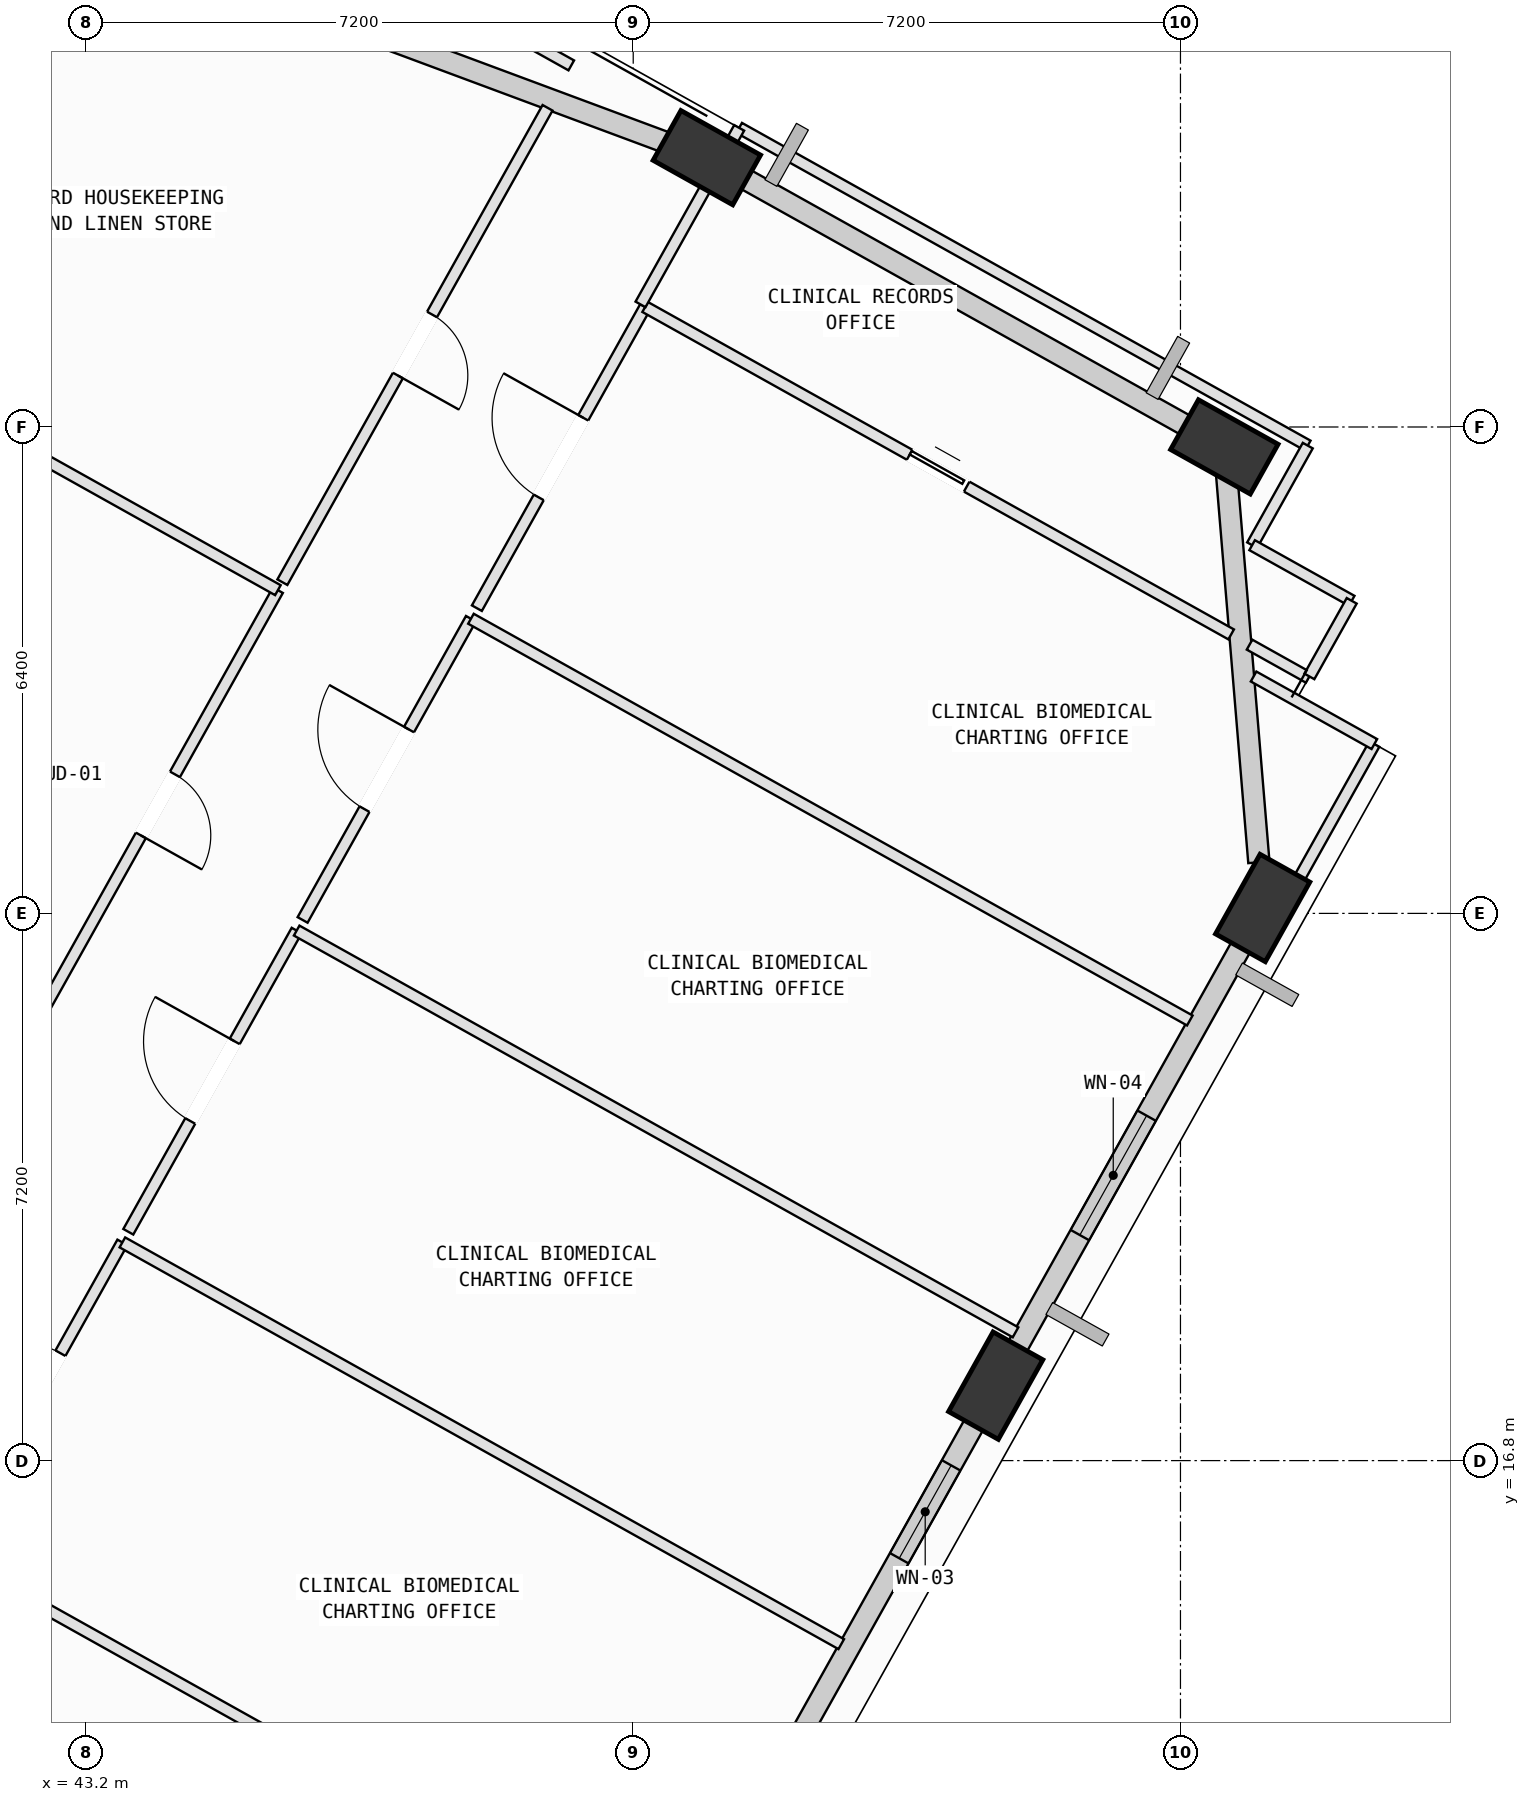
"""IFC4 building model, lengths in metres.
Left out: names, types, materials, properties, quantities, classifications, styles, units other than length and angle.
Written with IfcOpenShell. Run it as: python <this file> out.ifc"""

import sys

from ifc_helpers import new_model, si_unit, direction, frame, frame_2d, origin, origin_2d, place, context, subcontext, project, spatial, rectangle, extrude, element, fill, save


model = new_model("IFC4")
c1 = context("Model", 3, precision=1e-05, world=origin(), true_north=direction((0.0, 1.0)))
c2 = subcontext(c1, "Body", "Model", "MODEL_VIEW")
j1 = project(units=[si_unit("LENGTHUNIT", "METRE"), si_unit("PLANEANGLEUNIT", "RADIAN")], contexts=[c1])
p1 = place(None, origin())
s1 = spatial("IfcSite", under=j1, at=p1, CompositionType="ELEMENT")
p2 = place(p1, origin())
s2 = spatial("IfcBuilding", under=s1, at=p2, CompositionType="ELEMENT")
p3 = place(p2, frame((0.0, 0.0, 284.6)))
s3 = spatial("IfcBuildingStorey", under=s2, at=p3, CompositionType="ELEMENT", Elevation=284.6)
p4 = place(p3, frame((55.169, 17.786, 0.002), z_axis=(0.028221863199, 0.089227313173, 0.995611376503), x_axis=(-0.727236418404, -0.681508376608, 0.081691641922)))
e1 = element("IfcColumn", 1, at=p4, inside=s3, PredefinedType="COLUMN", context=c2, shape_type="SweptSolid", body=[
    extrude(rectangle(XDim=1.2, YDim=0.75, at=origin_2d()), origin(), (0.0, 0.0, 1.0), 4.014),
])
p5 = place(p3, frame((58.682, 24.071, 0.002), z_axis=(0.002187480979, 0.103419239641, 0.994635448694), x_axis=(-0.506111094693, -0.857728388357, 0.09029712972)))
e2 = element("IfcColumn", 2, at=p5, inside=s3, PredefinedType="COLUMN", context=c2, shape_type="SweptSolid", body=[
    extrude(rectangle(XDim=1.2, YDim=0.75, at=origin_2d()), origin(), (0.0, 0.0, 1.0), 4.018),
])
p6 = place(p3, frame((58.177, 30.138, 0.002), z_axis=(-0.022846369794, 0.101168100287, 0.994606987142), x_axis=(0.958366046335, -0.281023652811, 0.050598693589)))
e3 = element("IfcColumn", 3, at=p6, inside=s3, PredefinedType="COLUMN", context=c2, shape_type="SweptSolid", body=[
    extrude(rectangle(XDim=1.2, YDim=0.75, at=origin_2d()), origin(), (0.0, 0.0, 1.0), 4.018),
])
p7 = place(p3, frame((51.369, 33.943, 0.002), z_axis=(-0.038416755408, 0.073119688185, 0.996582994087), x_axis=(0.998889809046, -0.02440051973, 0.040295955385)))
e4 = element("IfcColumn", 4, at=p7, inside=s3, PredefinedType="COLUMN", context=c2, shape_type="SweptSolid", body=[
    extrude(rectangle(XDim=1.2, YDim=0.75, at=origin_2d()), origin(), (0.0, 0.0, 1.0), 4.01),
])
p8 = place(p3, frame((55.066, 17.601, 0.0), z_axis=(0.0, 0.0, 1.0), x_axis=(-0.487864059298, -0.872919618089, 0.0)))
e5 = element("IfcWall", 5, at=p8, inside=s3, PredefinedType="SOLIDWALL", context=c2, shape_type="SweptSolid", body=[
    extrude(rectangle(XDim=6.407, YDim=0.28, at=frame_2d((3.204, 0.0))), origin(), (0.0, 0.0, 1.0), 3.265),
])
p9 = place(p8, frame((0.99, 0.0, 0.75)))
e6 = element("IfcOpeningElement", 6, at=p9, cuts=e5, PredefinedType="OPENING", context=c2, shape_type="SweptSolid", body=[
    extrude(rectangle(XDim=1.4, YDim=1.85, at=frame_2d((0.7, 0.925))), frame((0.0, 0.15, 0.0), z_axis=(0.0, -1.0, 0.0), x_axis=(1.0, 0.0, 0.0)), (0.0, 0.0, 1.0), 0.3),
])
p10 = place(p3, frame((58.583, 23.895, 0.0), z_axis=(0.0, 0.0, 1.0), x_axis=(-0.487866540421, -0.872918231415, 0.0)))
e7 = element("IfcWall", 7, at=p10, inside=s3, PredefinedType="SOLIDWALL", context=c2, shape_type="SweptSolid", body=[
    extrude(rectangle(XDim=6.418, YDim=0.28, at=frame_2d((3.209, 0.0))), origin(), (0.0, 0.0, 1.0), 3.265),
])
p11 = place(p10, frame((2.928, 0.0, 0.75)))
e8 = element("IfcOpeningElement", 8, at=p11, cuts=e7, PredefinedType="OPENING", context=c2, shape_type="SweptSolid", body=[
    extrude(rectangle(XDim=1.8, YDim=2.05, at=frame_2d((0.9, 1.025))), frame((0.0, 0.15, 0.0), z_axis=(0.0, -1.0, 0.0), x_axis=(1.0, 0.0, 0.0)), (0.0, 0.0, 1.0), 0.3),
])
p12 = place(p3, frame((58.193, 29.948, 0.0), z_axis=(0.0, 0.0, 1.0), x_axis=(0.082827928137, -0.996563863644, 0.0)))
e9 = element("IfcWall", 9, at=p12, inside=s3, PredefinedType="SOLIDWALL", context=c2, shape_type="SweptSolid", body=[
    extrude(rectangle(XDim=5.294, YDim=0.28, at=frame_2d((2.647, 0.0))), origin(), (0.0, 0.0, 1.0), 3.265),
])
p13 = place(p3, frame((51.585, 33.822, 0.0), z_axis=(0.0, 0.0, 1.0), x_axis=(0.87291397176, -0.487874161957, 0.0)))
e10 = element("IfcWall", 10, at=p13, inside=s3, PredefinedType="SOLIDWALL", context=c2, shape_type="SweptSolid", body=[
    extrude(rectangle(XDim=7.046, YDim=0.28, at=frame_2d((3.523, 0.0))), origin(), (0.0, 0.0, 1.0), 3.265),
])
p14 = place(p3, frame((42.426, 37.271, 0.0), z_axis=(0.0, 0.0, 1.0), x_axis=(0.937221029634, -0.348735919588, 0.0)))
e11 = element("IfcWall", 11, at=p14, inside=s3, PredefinedType="SOLIDWALL", context=c2, shape_type="SweptSolid", body=[
    extrude(rectangle(XDim=9.037, YDim=0.28, at=frame_2d((4.518, 0.0))), origin(), (0.0, 0.0, 1.0), 3.265),
])
p15 = place(p3, frame((41.386, 15.569, 0.0), z_axis=(0.0, 0.0, 1.0), x_axis=(0.872874616124, -0.487944571161, 0.0)))
e12 = element("IfcWall", 12, at=p15, inside=s3, PredefinedType="PARTITIONING", context=c2, shape_type="SweptSolid", body=[
    extrude(rectangle(XDim=10.835, YDim=0.15, at=frame_2d((5.418, 0.0))), origin(), (0.0, 0.0, 1.0), 3.78),
])
p16 = place(p3, frame((41.464, 15.708, 0.0), z_axis=(0.0, 0.0, 1.0), x_axis=(0.487869568795, 0.872916538876, 0.0)))
e13 = element("IfcWall", 13, at=p16, inside=s3, PredefinedType="PARTITIONING", context=c2, shape_type="SweptSolid", body=[
    extrude(rectangle(XDim=4.54, YDim=0.15, at=frame_2d((2.27, 0.0))), origin(), (0.0, 0.0, 1.0), 3.78),
])
p17 = place(p16, frame((1.67, 0.0, 0.0)))
e14 = element("IfcOpeningElement", 14, at=p17, cuts=e13, PredefinedType="OPENING", context=c2, shape_type="SweptSolid", body=[
    extrude(rectangle(XDim=1.2, YDim=2.15, at=frame_2d((0.6, 1.075))), frame((0.0, 0.085, 0.0), z_axis=(0.0, -1.0, 0.0), x_axis=(1.0, 0.0, 0.0)), (0.0, 0.0, 1.0), 0.17),
])
p18 = place(p3, frame((43.679, 19.671, 0.0), z_axis=(0.0, 0.0, 1.0), x_axis=(0.872922597233, -0.487858728774, 0.0)))
e15 = element("IfcWall", 15, at=p18, inside=s3, PredefinedType="PARTITIONING", context=c2, shape_type="SweptSolid", body=[
    extrude(rectangle(XDim=10.835, YDim=0.15, at=frame_2d((5.417, 0.0))), origin(), (0.0, 0.0, 1.0), 3.78),
])
p19 = place(p3, frame((43.757, 19.811, 0.0), z_axis=(0.0, 0.0, 1.0), x_axis=(0.487869568795, 0.872916538876, 0.0)))
e16 = element("IfcWall", 16, at=p19, inside=s3, PredefinedType="PARTITIONING", context=c2, shape_type="SweptSolid", body=[
    extrude(rectangle(XDim=4.54, YDim=0.15, at=frame_2d((2.27, 0.0))), origin(), (0.0, 0.0, 1.0), 3.78),
])
p20 = place(p19, frame((1.67, 0.0, 0.0)))
e17 = element("IfcOpeningElement", 17, at=p20, cuts=e16, PredefinedType="OPENING", context=c2, shape_type="SweptSolid", body=[
    extrude(rectangle(XDim=1.2, YDim=2.15, at=frame_2d((0.6, 1.075))), frame((0.0, 0.085, 0.0), z_axis=(0.0, -1.0, 0.0), x_axis=(1.0, 0.0, 0.0)), (0.0, 0.0, 1.0), 0.17),
])
p21 = place(p3, frame((45.972, 23.774, 0.0), z_axis=(0.0, 0.0, 1.0), x_axis=(0.872922597233, -0.487858728774, 0.0)))
e18 = element("IfcWall", 18, at=p21, inside=s3, PredefinedType="PARTITIONING", context=c2, shape_type="SweptSolid", body=[
    extrude(rectangle(XDim=10.835, YDim=0.15, at=frame_2d((5.417, 0.0))), origin(), (0.0, 0.0, 1.0), 3.78),
])
p22 = place(p3, frame((55.653, 18.18, 0.0), z_axis=(0.0, 0.0, 1.0), x_axis=(-0.487710731174, -0.873005293625, 0.0)))
e19 = element("IfcWall", 19, at=p22, inside=s3, PredefinedType="PARTITIONING", context=c2, shape_type="SweptSolid", body=[
    extrude(rectangle(XDim=0.792, YDim=0.15, at=frame_2d((0.396, 0.0))), origin(), (0.0, 0.0, 1.0), 3.265),
])
p23 = place(p3, frame((46.05, 23.914, 0.0), z_axis=(0.0, 0.0, 1.0), x_axis=(0.487869568795, 0.872916538876, 0.0)))
e20 = element("IfcWall", 20, at=p23, inside=s3, PredefinedType="PARTITIONING", context=c2, shape_type="SweptSolid", body=[
    extrude(rectangle(XDim=4.54, YDim=0.15, at=frame_2d((2.27, 0.0))), origin(), (0.0, 0.0, 1.0), 3.78),
])
p24 = place(p23, frame((1.67, 0.0, 0.0)))
e21 = element("IfcOpeningElement", 21, at=p24, cuts=e20, PredefinedType="OPENING", context=c2, shape_type="SweptSolid", body=[
    extrude(rectangle(XDim=1.2, YDim=2.15, at=frame_2d((0.6, 1.075))), frame((0.0, 0.085, 0.0), z_axis=(0.0, -1.0, 0.0), x_axis=(1.0, 0.0, 0.0)), (0.0, 0.0, 1.0), 0.17),
])
p25 = place(p3, frame((48.265, 27.877, 0.0), z_axis=(0.0, 0.0, 1.0), x_axis=(0.872922597233, -0.487858728774, 0.0)))
e22 = element("IfcWall", 22, at=p25, inside=s3, PredefinedType="PARTITIONING", context=c2, shape_type="SweptSolid", body=[
    extrude(rectangle(XDim=10.835, YDim=0.15, at=frame_2d((5.417, 0.0))), origin(), (0.0, 0.0, 1.0), 3.78),
])
p26 = place(p3, frame((60.151, 26.228, 0.0), z_axis=(0.0, 0.0, 1.0), x_axis=(-0.487979572621, -0.87285504908, 0.0)))
e23 = element("IfcWall", 23, at=p26, inside=s3, PredefinedType="PARTITIONING", context=c2, shape_type="SweptSolid", body=[
    extrude(rectangle(XDim=2.801, YDim=0.15, at=frame_2d((1.401, 0.0))), origin(), (0.0, 0.0, 1.0), 3.265),
])
p27 = place(p3, frame((48.343, 28.016, 0.0), z_axis=(0.0, 0.0, 1.0), x_axis=(0.487705632738, 0.873008141884, 0.0)))
e24 = element("IfcWall", 24, at=p27, inside=s3, PredefinedType="PARTITIONING", context=c2, shape_type="SweptSolid", body=[
    extrude(rectangle(XDim=4.539, YDim=0.15, at=frame_2d((2.27, 0.0))), origin(), (0.0, 0.0, 1.0), 3.78),
])
p28 = place(p27, frame((1.67, 0.0, 0.0)))
e25 = element("IfcOpeningElement", 25, at=p28, cuts=e24, PredefinedType="OPENING", context=c2, shape_type="SweptSolid", body=[
    extrude(rectangle(XDim=1.2, YDim=2.15, at=frame_2d((0.6, 1.075))), frame((0.0, 0.085, 0.0), z_axis=(0.0, -1.0, 0.0), x_axis=(1.0, 0.0, 0.0)), (0.0, 0.0, 1.0), 0.17),
])
p29 = place(p3, frame((50.557, 31.979, 0.0), z_axis=(0.0, 0.0, 1.0), x_axis=(0.872969446745, -0.487774891779, 0.0)))
e26 = element("IfcWall", 26, at=p29, inside=s3, PredefinedType="PARTITIONING", context=c2, shape_type="SweptSolid", body=[
    extrude(rectangle(XDim=8.832, YDim=0.15, at=frame_2d((4.416, 0.0))), origin(), (0.0, 0.0, 1.0), 3.78),
])
p30 = place(p29, frame((3.986, 0.0, 0.0)))
e27 = element("IfcOpeningElement", 27, at=p30, cuts=e26, PredefinedType="OPENING", context=c2, shape_type="SweptSolid", body=[
    extrude(rectangle(XDim=0.86, YDim=2.06, at=frame_2d((0.43, 1.03))), frame((0.0, 0.085, 0.0), z_axis=(0.0, -1.0, 0.0), x_axis=(1.0, 0.0, 0.0)), (0.0, 0.0, 1.0), 0.17),
])
p31 = place(p3, frame((58.509, 27.536, 0.0), z_axis=(0.0, 0.0, 1.0), x_axis=(0.872940051513, -0.487827496625, 0.0)))
e28 = element("IfcWall", 28, at=p31, inside=s3, PredefinedType="PARTITIONING", context=c2, shape_type="SweptSolid", body=[
    extrude(rectangle(XDim=0.891, YDim=0.15, at=frame_2d((0.446, 0.0))), origin(), (0.0, 0.0, 1.0), 3.78),
])
p32 = place(p3, frame((58.562, 27.117, 0.0), z_axis=(0.0, 0.0, 1.0), x_axis=(0.872704884488, -0.488248076893, 0.0)))
e29 = element("IfcWall", 29, at=p32, inside=s3, PredefinedType="PARTITIONING", context=c2, shape_type="SweptSolid", body=[
    extrude(rectangle(XDim=1.821, YDim=0.15, at=frame_2d((0.91, 0.0))), origin(), (0.0, 0.0, 1.0), 3.78),
])
p33 = place(p3, frame((45.725, 28.253, 0.0), z_axis=(0.0, 0.0, 1.0), x_axis=(-0.487784157337, -0.872964269515, 0.0)))
e30 = element("IfcWall", 30, at=p33, inside=s3, PredefinedType="PARTITIONING", context=c2, shape_type="SweptSolid", body=[
    extrude(rectangle(XDim=6.472, YDim=0.15, at=frame_2d((3.236, 0.0))), origin(), (0.0, 0.0, 1.0), 3.78),
])
p34 = place(p33, frame((2.776, 0.0, 0.0)))
e31 = element("IfcOpeningElement", 31, at=p34, cuts=e30, PredefinedType="OPENING", context=c2, shape_type="SweptSolid", body=[
    extrude(rectangle(XDim=0.92, YDim=2.1, at=frame_2d((0.46, 1.05))), frame((0.0, 0.085, 0.0), z_axis=(0.0, -1.0, 0.0), x_axis=(1.0, 0.0, 0.0)), (0.0, 0.0, 1.0), 0.17),
])
p35 = place(p3, frame((39.235, 31.881, 0.0), z_axis=(0.0, 0.0, 1.0), x_axis=(0.872862453115, -0.487966328697, 0.0)))
e32 = element("IfcWall", 32, at=p35, inside=s3, PredefinedType="PARTITIONING", context=c2, shape_type="SweptSolid", body=[
    extrude(rectangle(XDim=7.435, YDim=0.15, at=frame_2d((3.718, 0.0))), origin(), (0.0, 0.0, 1.0), 3.78),
])
p36 = place(p3, frame((43.823, 38.378, 0.0), z_axis=(0.0, 0.0, 1.0), x_axis=(0.872940239318, -0.487827160559, 0.0)))
e33 = element("IfcWall", 33, at=p36, inside=s3, PredefinedType="PARTITIONING", context=c2, shape_type="SweptSolid", body=[
    extrude(rectangle(XDim=6.601, YDim=0.15, at=frame_2d((3.3, 0.0))), origin(), (0.0, 0.0, 1.0), 3.265),
])
p37 = place(p3, frame((49.273, 34.6, 0.0), z_axis=(0.0, 0.0, 1.0), x_axis=(-0.487899403607, -0.87289986365, 0.0)))
e34 = element("IfcWall", 34, at=p37, inside=s3, PredefinedType="PARTITIONING", context=c2, shape_type="SweptSolid", body=[
    extrude(rectangle(XDim=7.151, YDim=0.15, at=frame_2d((3.576, 0.0))), origin(), (0.0, 0.0, 1.0), 3.78),
])
p38 = place(p37, frame((3.115, 0.0, 0.0)))
e35 = element("IfcOpeningElement", 35, at=p38, cuts=e34, PredefinedType="OPENING", context=c2, shape_type="SweptSolid", body=[
    extrude(rectangle(XDim=0.92, YDim=2.1, at=frame_2d((0.46, 1.05))), frame((0.0, 0.085, 0.0), z_axis=(0.0, -1.0, 0.0), x_axis=(1.0, 0.0, 0.0)), (0.0, 0.0, 1.0), 0.17),
])
p39 = place(p3, frame((51.794, 34.336, 0.0), z_axis=(0.0, 0.0, 1.0), x_axis=(0.872924927779, -0.487854558717, 0.0)))
e36 = element("IfcWall", 36, at=p39, inside=s3, PredefinedType="PARTITIONING", context=c2, shape_type="SweptSolid", body=[
    extrude(rectangle(XDim=8.57, YDim=0.15, at=frame_2d((4.285, 0.0))), origin(), (0.0, 0.0, 1.0), 3.265),
])
for number, where, z_axis, x_axis in (
    (37, (59.275, 30.155, 0.0), (0.0, 0.0, 1.0), (-0.488, -0.873, 0.0)),
    (38, (58.543, 28.845, 0.0), (0.0, 0.0, 1.0), (0.873, -0.488, 0.0)),
):
    element("IfcWall", number, at=place(p3, frame(where, z_axis=z_axis, x_axis=x_axis)), inside=s3, PredefinedType="PARTITIONING", context=c2, shape_type="SweptSolid", body=[
        extrude(rectangle(XDim=1.501, YDim=0.15, at=frame_2d((0.75, 0.0))), origin(), (0.0, 0.0, 1.0), 3.78),
    ])
p40 = place(p3, frame((59.853, 28.113, 0.0), z_axis=(0.0, 0.0, 1.0), x_axis=(-0.488512105395, -0.872557117261, 0.0)))
e39 = element("IfcWall", 39, at=p40, inside=s3, PredefinedType="PARTITIONING", context=c2, shape_type="SweptSolid", body=[
    extrude(rectangle(XDim=1.14, YDim=0.15, at=frame_2d((0.57, 0.0))), origin(), (0.0, 0.0, 1.0), 3.78),
])
p41 = place(p3, frame((50.496, 32.013, 0.0), z_axis=(0.0, 0.0, 1.0), x_axis=(0.487910811587, 0.872893487166, 0.0)))
e40 = element("IfcWall", 40, at=p41, inside=s3, PredefinedType="PARTITIONING", context=c2, shape_type="SweptSolid", body=[
    extrude(rectangle(XDim=2.019, YDim=0.15, at=frame_2d((1.009, 0.0))), origin(), (0.0, 0.0, 1.0), 3.78),
])
p42 = place(p3, frame((51.571, 33.936, 0.0), z_axis=(0.0, 0.0, 1.0), x_axis=(0.486864926044, 0.873477271478, 0.0)))
e41 = element("IfcWall", 41, at=p42, inside=s3, PredefinedType="PARTITIONING", context=c2, shape_type="SweptSolid", body=[
    extrude(rectangle(XDim=0.458, YDim=0.15, at=frame_2d((0.229, 0.0))), origin(), (0.0, 0.0, 1.0), 3.78),
])
p43 = place(p9, origin())
e42 = element("IfcWindow", 42, at=p43, inside=s3, PartitioningType="SINGLE_PANEL", PredefinedType="WINDOW", context=c2, shape_type="SweptSolid", body=[
    extrude(rectangle(XDim=1.4, YDim=1.85, at=frame_2d((0.7, 0.925))), frame((0.0, 0.03, 0.0), z_axis=(0.0, -1.0, 0.0), x_axis=(1.0, 0.0, 0.0)), (0.0, 0.0, 1.0), 0.06),
])
fill(e6, e42)
p44 = place(p11, origin())
e43 = element("IfcWindow", 43, at=p44, inside=s3, PartitioningType="SINGLE_PANEL", PredefinedType="WINDOW", context=c2, shape_type="SweptSolid", body=[
    extrude(rectangle(XDim=1.8, YDim=2.05, at=frame_2d((0.9, 1.025))), frame((0.0, 0.03, 0.0), z_axis=(0.0, -1.0, 0.0), x_axis=(1.0, 0.0, 0.0)), (0.0, 0.0, 1.0), 0.06),
])
fill(e8, e43)
p45 = place(p17, origin())
e44 = element("IfcDoor", 44, at=p45, inside=s3, OperationType="SINGLE_SWING_LEFT", PredefinedType="DOOR", context=c2, shape_type="SweptSolid", body=[
    extrude(rectangle(XDim=1.2, YDim=2.15, at=frame_2d((0.6, 1.075))), frame((0.0, 0.025, 0.0), z_axis=(0.0, -1.0, 0.0), x_axis=(1.0, 0.0, 0.0)), (0.0, 0.0, 1.0), 0.05),
])
fill(e14, e44)
p46 = place(p20, origin())
e45 = element("IfcDoor", 45, at=p46, inside=s3, OperationType="SINGLE_SWING_RIGHT", PredefinedType="DOOR", context=c2, shape_type="SweptSolid", body=[
    extrude(rectangle(XDim=1.2, YDim=2.15, at=frame_2d((0.6, 1.075))), frame((0.0, 0.025, 0.0), z_axis=(0.0, -1.0, 0.0), x_axis=(1.0, 0.0, 0.0)), (0.0, 0.0, 1.0), 0.05),
])
fill(e17, e45)
p47 = place(p24, origin())
e46 = element("IfcDoor", 46, at=p47, inside=s3, OperationType="SINGLE_SWING_RIGHT", PredefinedType="DOOR", context=c2, shape_type="SweptSolid", body=[
    extrude(rectangle(XDim=1.2, YDim=2.15, at=frame_2d((0.6, 1.075))), frame((0.0, 0.025, 0.0), z_axis=(0.0, -1.0, 0.0), x_axis=(1.0, 0.0, 0.0)), (0.0, 0.0, 1.0), 0.05),
])
fill(e21, e46)
p48 = place(p28, origin())
e47 = element("IfcDoor", 47, at=p48, inside=s3, OperationType="SINGLE_SWING_RIGHT", PredefinedType="DOOR", context=c2, shape_type="SweptSolid", body=[
    extrude(rectangle(XDim=1.2, YDim=2.15, at=frame_2d((0.6, 1.075))), frame((0.0, 0.025, 0.0), z_axis=(0.0, -1.0, 0.0), x_axis=(1.0, 0.0, 0.0)), (0.0, 0.0, 1.0), 0.05),
])
fill(e25, e47)
p49 = place(p34, origin())
e48 = element("IfcDoor", 48, at=p49, inside=s3, OperationType="SINGLE_SWING_RIGHT", PredefinedType="DOOR", context=c2, shape_type="SweptSolid", body=[
    extrude(rectangle(XDim=0.92, YDim=2.1, at=frame_2d((0.46, 1.05))), frame((0.0, 0.025, 0.0), z_axis=(0.0, -1.0, 0.0), x_axis=(1.0, 0.0, 0.0)), (0.0, 0.0, 1.0), 0.05),
])
fill(e31, e48)
p50 = place(p38, origin())
e49 = element("IfcDoor", 49, at=p50, inside=s3, OperationType="SINGLE_SWING_RIGHT", PredefinedType="DOOR", context=c2, shape_type="SweptSolid", body=[
    extrude(rectangle(XDim=0.92, YDim=2.1, at=frame_2d((0.46, 1.05))), frame((0.0, 0.025, 0.0), z_axis=(0.0, -1.0, 0.0), x_axis=(1.0, 0.0, 0.0)), (0.0, 0.0, 1.0), 0.05),
])
fill(e35, e49)
p51 = place(p30, origin())
e50 = element("IfcDoor", 50, at=p51, inside=s3, OperationType="SLIDING_TO_LEFT", PredefinedType="DOOR", context=c2, shape_type="SweptSolid", body=[
    extrude(rectangle(XDim=0.86, YDim=2.06, at=frame_2d((0.43, 1.03))), frame((0.0, 0.025, 0.0), z_axis=(0.0, -1.0, 0.0), x_axis=(1.0, 0.0, 0.0)), (0.0, 0.0, 1.0), 0.05),
])
fill(e27, e50)
save(model, sys.argv[1])
